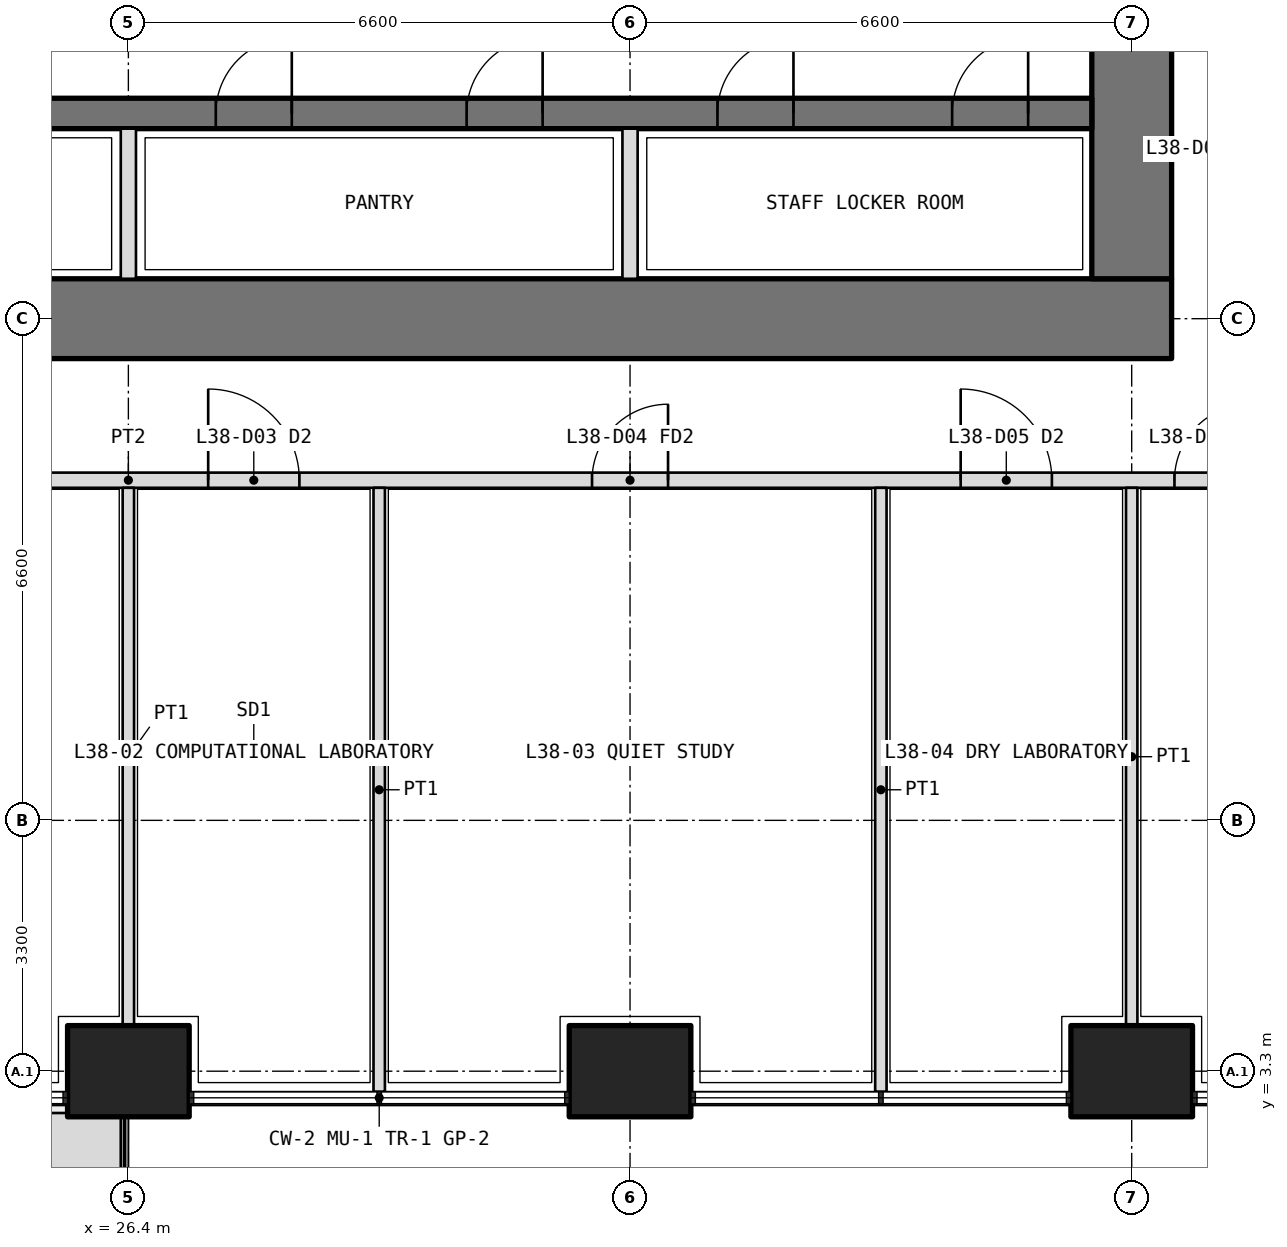
"""IFC4 building model, lengths in metres.
Left out: names, types, materials, properties, quantities, classifications, styles, units other than length and angle.
Written with IfcOpenShell. Run it as: python <this file> out.ifc"""

import sys

from ifc_helpers import new_model, si_unit, direction, frame, frame_2d, origin, origin_2d, place, context, subcontext, project, spatial, polyline, rectangle, outline, extrude, element, fill, save


model = new_model("IFC4")
c1 = context("Model", 3, precision=1e-05, world=origin(), true_north=direction((0.0, 1.0)))
c2 = subcontext(c1, "Body", "Model", "MODEL_VIEW")
j1 = project(units=[si_unit("LENGTHUNIT", "METRE"), si_unit("PLANEANGLEUNIT", "RADIAN")], contexts=[c1])
p1 = place(None, origin())
s1 = spatial("IfcSite", under=j1, at=p1, CompositionType="ELEMENT")
p2 = place(p1, origin())
s2 = spatial("IfcBuilding", under=s1, at=p2, CompositionType="ELEMENT")
p3 = place(p2, frame((0.0, 0.0, 168.3)))
s3 = spatial("IfcBuildingStorey", under=s2, at=p3, CompositionType="ELEMENT", Elevation=168.3)
for number, where, z_axis, x_axis in (
    (1, (26.4, 3.3, 0.0), (0.0, 0.0, 1.0), (1.0, 0.0, 0.0)),
    (2, (33.0, 3.3, 0.0), (0.0, 0.0, 1.0), (1.0, 0.0, 0.0)),
    (3, (39.6, 3.3, 0.0), (0.0, 0.0, 1.0), (1.0, 0.0, 0.0)),
):
    element("IfcColumn", number, at=place(p3, frame(where, z_axis=z_axis, x_axis=x_axis)), inside=s3, PredefinedType="COLUMN", context=c2, shape_type="SweptSolid", body=[
        extrude(rectangle(XDim=1.6, YDim=1.2, at=origin_2d()), origin(), (0.0, 0.0, 1.0), 4.2),
    ])
p4 = place(p3, origin())
e4 = element("IfcWall", 4, at=p4, inside=s3, PredefinedType="USERDEFINED", context=c2, shape_type="SweptSolid", body=[
    extrude(outline(polyline([(17.25, 1.75), (26.3, 1.75), (26.3, 2.75), (17.25, 2.75), (17.25, 1.75)]), holes=[polyline([(17.4, 1.9), (26.15, 1.9), (26.15, 2.6), (17.4, 2.6), (17.4, 1.9)])]), origin(), (0.0, 0.0, 1.0), 1.05),
])
p5 = place(p3, frame((12.675, 13.2, 0.0), z_axis=(0.0, 0.0, 1.0), x_axis=(1.0, 0.0, 0.0)))
e5 = element("IfcWall", 5, at=p5, inside=s3, PredefinedType="SHEAR", context=c2, shape_type="SweptSolid", body=[
    extrude(rectangle(XDim=27.45, YDim=1.05, at=frame_2d((13.725, 0.0))), origin(), (0.0, 0.0, 1.0), 4.2),
])
p6 = place(p3, frame((39.6, 13.725, 0.0), z_axis=(0.0, 0.0, 1.0), x_axis=(0.0, 1.0, 0.0)))
e6 = element("IfcWall", 6, at=p6, inside=s3, PredefinedType="SHEAR", context=c2, shape_type="SweptSolid", body=[
    extrude(rectangle(XDim=18.75, YDim=1.05, at=frame_2d((9.375, 0.0))), origin(), (0.0, 0.0, 1.0), 4.2),
])
p7 = place(p6, frame((3.025, 0.0, 0.0)))
e7 = element("IfcOpeningElement", 7, at=p7, cuts=e6, PredefinedType="OPENING", context=c2, shape_type="SweptSolid", body=[
    extrude(rectangle(XDim=1.6, YDim=2.1, at=frame_2d((0.8, 1.05))), frame((0.0, 0.535, 0.0), z_axis=(0.0, -1.0, 0.0), x_axis=(1.0, 0.0, 0.0)), (0.0, 0.0, 1.0), 1.07),
])
p8 = place(p6, frame((13.825, 0.0, 0.0)))
e8 = element("IfcOpeningElement", 8, at=p8, cuts=e6, PredefinedType="OPENING", context=c2, shape_type="SweptSolid", body=[
    extrude(rectangle(XDim=1.6, YDim=2.1, at=frame_2d((0.8, 1.05))), frame((0.0, 0.535, 0.0), z_axis=(0.0, -1.0, 0.0), x_axis=(1.0, 0.0, 0.0)), (0.0, 0.0, 1.0), 1.07),
])
p9 = place(p3, frame((13.725, 15.9, 0.0), z_axis=(0.0, 0.0, 1.0), x_axis=(1.0, 0.0, 0.0)))
e9 = element("IfcWall", 9, at=p9, inside=s3, PredefinedType="SHEAR", context=c2, shape_type="SweptSolid", body=[
    extrude(rectangle(XDim=25.35, YDim=0.4, at=frame_2d((12.675, 0.0))), origin(), (0.0, 0.0, 1.0), 4.2),
])
p10 = place(p9, frame((0.837, 0.0, 0.0)))
e10 = element("IfcOpeningElement", 10, at=p10, cuts=e9, PredefinedType="OPENING", context=c2, shape_type="SweptSolid", body=[
    extrude(rectangle(XDim=1.0, YDim=2.1, at=frame_2d((0.5, 1.05))), frame((0.0, 0.21, 0.0), z_axis=(0.0, -1.0, 0.0), x_axis=(1.0, 0.0, 0.0)), (0.0, 0.0, 1.0), 0.42),
])
p11 = place(p9, frame((3.925, 0.0, 0.0)))
e11 = element("IfcOpeningElement", 11, at=p11, cuts=e9, PredefinedType="OPENING", context=c2, shape_type="SweptSolid", body=[
    extrude(rectangle(XDim=1.0, YDim=2.1, at=frame_2d((0.5, 1.05))), frame((0.0, 0.21, 0.0), z_axis=(0.0, -1.0, 0.0), x_axis=(1.0, 0.0, 0.0)), (0.0, 0.0, 1.0), 0.42),
])
p12 = place(p9, frame((7.225, 0.0, 0.0)))
e12 = element("IfcOpeningElement", 12, at=p12, cuts=e9, PredefinedType="OPENING", context=c2, shape_type="SweptSolid", body=[
    extrude(rectangle(XDim=1.0, YDim=2.1, at=frame_2d((0.5, 1.05))), frame((0.0, 0.21, 0.0), z_axis=(0.0, -1.0, 0.0), x_axis=(1.0, 0.0, 0.0)), (0.0, 0.0, 1.0), 0.42),
])
p13 = place(p9, frame((10.525, 0.0, 0.0)))
e13 = element("IfcOpeningElement", 13, at=p13, cuts=e9, PredefinedType="OPENING", context=c2, shape_type="SweptSolid", body=[
    extrude(rectangle(XDim=1.0, YDim=2.1, at=frame_2d((0.5, 1.05))), frame((0.0, 0.21, 0.0), z_axis=(0.0, -1.0, 0.0), x_axis=(1.0, 0.0, 0.0)), (0.0, 0.0, 1.0), 0.42),
])
p14 = place(p9, frame((13.825, 0.0, 0.0)))
e14 = element("IfcOpeningElement", 14, at=p14, cuts=e9, PredefinedType="OPENING", context=c2, shape_type="SweptSolid", body=[
    extrude(rectangle(XDim=1.0, YDim=2.1, at=frame_2d((0.5, 1.05))), frame((0.0, 0.21, 0.0), z_axis=(0.0, -1.0, 0.0), x_axis=(1.0, 0.0, 0.0)), (0.0, 0.0, 1.0), 0.42),
])
p15 = place(p9, frame((17.125, 0.0, 0.0)))
e15 = element("IfcOpeningElement", 15, at=p15, cuts=e9, PredefinedType="OPENING", context=c2, shape_type="SweptSolid", body=[
    extrude(rectangle(XDim=1.0, YDim=2.1, at=frame_2d((0.5, 1.05))), frame((0.0, 0.21, 0.0), z_axis=(0.0, -1.0, 0.0), x_axis=(1.0, 0.0, 0.0)), (0.0, 0.0, 1.0), 0.42),
])
p16 = place(p9, frame((20.425, 0.0, 0.0)))
e16 = element("IfcOpeningElement", 16, at=p16, cuts=e9, PredefinedType="OPENING", context=c2, shape_type="SweptSolid", body=[
    extrude(rectangle(XDim=1.0, YDim=2.1, at=frame_2d((0.5, 1.05))), frame((0.0, 0.21, 0.0), z_axis=(0.0, -1.0, 0.0), x_axis=(1.0, 0.0, 0.0)), (0.0, 0.0, 1.0), 0.42),
])
p17 = place(p9, frame((23.512, 0.0, 0.0)))
e17 = element("IfcOpeningElement", 17, at=p17, cuts=e9, PredefinedType="OPENING", context=c2, shape_type="SweptSolid", body=[
    extrude(rectangle(XDim=1.0, YDim=2.1, at=frame_2d((0.5, 1.05))), frame((0.0, 0.21, 0.0), z_axis=(0.0, -1.0, 0.0), x_axis=(1.0, 0.0, 0.0)), (0.0, 0.0, 1.0), 0.42),
])
for number, where, z_axis, x_axis in (
    (18, (26.4, 13.725, 0.0), (0.0, 0.0, 1.0), (0.0, 1.0, 0.0)),
    (19, (33.0, 13.725, 0.0), (0.0, 0.0, 1.0), (0.0, 1.0, 0.0)),
):
    element("IfcWall", number, at=place(p3, frame(where, z_axis=z_axis, x_axis=x_axis)), inside=s3, PredefinedType="PARTITIONING", context=c2, shape_type="SweptSolid", body=[
        extrude(rectangle(XDim=1.975, YDim=0.2, at=frame_2d((0.987, 0.0))), origin(), (0.0, 0.0, 1.0), 4.2),
    ])
p18 = place(p3, frame((10.975, 11.075, 0.0), z_axis=(0.0, 0.0, 1.0), x_axis=(1.0, 0.0, 0.0)))
e20 = element("IfcWall", 20, at=p18, inside=s3, PredefinedType="PARTITIONING", context=c2, shape_type="SweptSolid", body=[
    extrude(rectangle(XDim=30.85, YDim=0.2, at=frame_2d((15.425, 0.0))), origin(), (0.0, 0.0, 1.0), 2.85),
])
p19 = place(p18, frame((7.262, 0.0, 0.0)))
e21 = element("IfcOpeningElement", 21, at=p19, cuts=e20, PredefinedType="OPENING", context=c2, shape_type="SweptSolid", body=[
    extrude(rectangle(XDim=1.0, YDim=2.1, at=frame_2d((0.5, 1.05))), frame((0.0, 0.11, 0.0), z_axis=(0.0, -1.0, 0.0), x_axis=(1.0, 0.0, 0.0)), (0.0, 0.0, 1.0), 0.22),
])
p20 = place(p18, frame((16.475, 0.0, 0.0)))
e22 = element("IfcOpeningElement", 22, at=p20, cuts=e20, PredefinedType="OPENING", context=c2, shape_type="SweptSolid", body=[
    extrude(rectangle(XDim=1.2, YDim=2.1, at=frame_2d((0.6, 1.05))), frame((0.0, 0.11, 0.0), z_axis=(0.0, -1.0, 0.0), x_axis=(1.0, 0.0, 0.0)), (0.0, 0.0, 1.0), 0.22),
])
p21 = place(p18, frame((21.525, 0.0, 0.0)))
e23 = element("IfcOpeningElement", 23, at=p21, cuts=e20, PredefinedType="OPENING", context=c2, shape_type="SweptSolid", body=[
    extrude(rectangle(XDim=1.0, YDim=2.1, at=frame_2d((0.5, 1.05))), frame((0.0, 0.11, 0.0), z_axis=(0.0, -1.0, 0.0), x_axis=(1.0, 0.0, 0.0)), (0.0, 0.0, 1.0), 0.22),
])
p22 = place(p18, frame((26.375, 0.0, 0.0)))
e24 = element("IfcOpeningElement", 24, at=p22, cuts=e20, PredefinedType="OPENING", context=c2, shape_type="SweptSolid", body=[
    extrude(rectangle(XDim=1.2, YDim=2.1, at=frame_2d((0.6, 1.05))), frame((0.0, 0.11, 0.0), z_axis=(0.0, -1.0, 0.0), x_axis=(1.0, 0.0, 0.0)), (0.0, 0.0, 1.0), 0.22),
])
p23 = place(p18, frame((29.188, 0.0, 0.0)))
e25 = element("IfcOpeningElement", 25, at=p23, cuts=e20, PredefinedType="OPENING", context=c2, shape_type="SweptSolid", body=[
    extrude(rectangle(XDim=1.0, YDim=2.1, at=frame_2d((0.5, 1.05))), frame((0.0, 0.11, 0.0), z_axis=(0.0, -1.0, 0.0), x_axis=(1.0, 0.0, 0.0)), (0.0, 0.0, 1.0), 0.22),
])
p24 = place(p3, frame((26.4, 3.9, 0.0), z_axis=(0.0, 0.0, 1.0), x_axis=(0.0, 1.0, 0.0)))
e26 = element("IfcWall", 26, at=p24, inside=s3, PredefinedType="PARTITIONING", context=c2, shape_type="SweptSolid", body=[
    extrude(rectangle(XDim=7.075, YDim=0.15, at=frame_2d((3.538, 0.0))), origin(), (0.0, 0.0, 1.0), 2.85),
])
for number, where, z_axis, x_axis in (
    (27, (29.7, 3.03, 0.0), (0.0, 0.0, 1.0), (0.0, 1.0, 0.0)),
    (28, (36.3, 3.03, 0.0), (0.0, 0.0, 1.0), (0.0, 1.0, 0.0)),
):
    element("IfcWall", number, at=place(p3, frame(where, z_axis=z_axis, x_axis=x_axis)), inside=s3, PredefinedType="PARTITIONING", context=c2, shape_type="SweptSolid", body=[
        extrude(rectangle(XDim=7.945, YDim=0.15, at=frame_2d((3.973, 0.0))), origin(), (0.0, 0.0, 1.0), 2.7),
    ])
p25 = place(p3, frame((39.6, 3.9, 0.0), z_axis=(0.0, 0.0, 1.0), x_axis=(0.0, 1.0, 0.0)))
e29 = element("IfcWall", 29, at=p25, inside=s3, PredefinedType="PARTITIONING", context=c2, shape_type="SweptSolid", body=[
    extrude(rectangle(XDim=7.075, YDim=0.15, at=frame_2d((3.538, 0.0))), origin(), (0.0, 0.0, 1.0), 2.85),
])
p26 = place(p20, origin())
e30 = element("IfcDoor", 30, at=p26, inside=s3, OperationType="DOUBLE_DOOR_SINGLE_SWING", PredefinedType="DOOR", context=c2, shape_type="SweptSolid", body=[
    extrude(rectangle(XDim=1.2, YDim=2.1, at=frame_2d((0.6, 1.05))), frame((0.0, 0.025, 0.0), z_axis=(0.0, -1.0, 0.0), x_axis=(1.0, 0.0, 0.0)), (0.0, 0.0, 1.0), 0.05),
])
fill(e22, e30)
p27 = place(p21, origin())
e31 = element("IfcDoor", 31, at=p27, inside=s3, OperationType="SINGLE_SWING_RIGHT", PredefinedType="DOOR", context=c2, shape_type="SweptSolid", body=[
    extrude(rectangle(XDim=1.0, YDim=2.1, at=frame_2d((0.5, 1.05))), frame((0.0, 0.025, 0.0), z_axis=(0.0, -1.0, 0.0), x_axis=(1.0, 0.0, 0.0)), (0.0, 0.0, 1.0), 0.05),
])
fill(e23, e31)
p28 = place(p22, origin())
e32 = element("IfcDoor", 32, at=p28, inside=s3, OperationType="DOUBLE_DOOR_SINGLE_SWING", PredefinedType="DOOR", context=c2, shape_type="SweptSolid", body=[
    extrude(rectangle(XDim=1.2, YDim=2.1, at=frame_2d((0.6, 1.05))), frame((0.0, 0.025, 0.0), z_axis=(0.0, -1.0, 0.0), x_axis=(1.0, 0.0, 0.0)), (0.0, 0.0, 1.0), 0.05),
])
fill(e24, e32)
p29 = place(p23, origin())
e33 = element("IfcDoor", 33, at=p29, inside=s3, OperationType="SINGLE_SWING_RIGHT", PredefinedType="DOOR", context=c2, shape_type="SweptSolid", body=[
    extrude(rectangle(XDim=1.0, YDim=2.1, at=frame_2d((0.5, 1.05))), frame((0.0, 0.025, 0.0), z_axis=(0.0, -1.0, 0.0), x_axis=(1.0, 0.0, 0.0)), (0.0, 0.0, 1.0), 0.05),
])
fill(e25, e33)
p30 = place(p14, origin())
e34 = element("IfcDoor", 34, at=p30, inside=s3, OperationType="SINGLE_SWING_RIGHT", PredefinedType="DOOR", context=c2, shape_type="SweptSolid", body=[
    extrude(rectangle(XDim=1.0, YDim=2.1, at=frame_2d((0.5, 1.05))), frame((0.0, 0.025, 0.0), z_axis=(0.0, -1.0, 0.0), x_axis=(1.0, 0.0, 0.0)), (0.0, 0.0, 1.0), 0.05),
])
fill(e14, e34)
p31 = place(p15, origin())
e35 = element("IfcDoor", 35, at=p31, inside=s3, OperationType="SINGLE_SWING_RIGHT", PredefinedType="DOOR", context=c2, shape_type="SweptSolid", body=[
    extrude(rectangle(XDim=1.0, YDim=2.1, at=frame_2d((0.5, 1.05))), frame((0.0, 0.025, 0.0), z_axis=(0.0, -1.0, 0.0), x_axis=(1.0, 0.0, 0.0)), (0.0, 0.0, 1.0), 0.05),
])
fill(e15, e35)
p32 = place(p16, origin())
e36 = element("IfcDoor", 36, at=p32, inside=s3, OperationType="SINGLE_SWING_RIGHT", PredefinedType="DOOR", context=c2, shape_type="SweptSolid", body=[
    extrude(rectangle(XDim=1.0, YDim=2.1, at=frame_2d((0.5, 1.05))), frame((0.0, 0.025, 0.0), z_axis=(0.0, -1.0, 0.0), x_axis=(1.0, 0.0, 0.0)), (0.0, 0.0, 1.0), 0.05),
])
fill(e16, e36)
p33 = place(p17, origin())
e37 = element("IfcDoor", 37, at=p33, inside=s3, OperationType="SINGLE_SWING_RIGHT", PredefinedType="DOOR", context=c2, shape_type="SweptSolid", body=[
    extrude(rectangle(XDim=1.0, YDim=2.1, at=frame_2d((0.5, 1.05))), frame((0.0, 0.025, 0.0), z_axis=(0.0, -1.0, 0.0), x_axis=(1.0, 0.0, 0.0)), (0.0, 0.0, 1.0), 0.05),
])
fill(e17, e37)
save(model, sys.argv[1])
